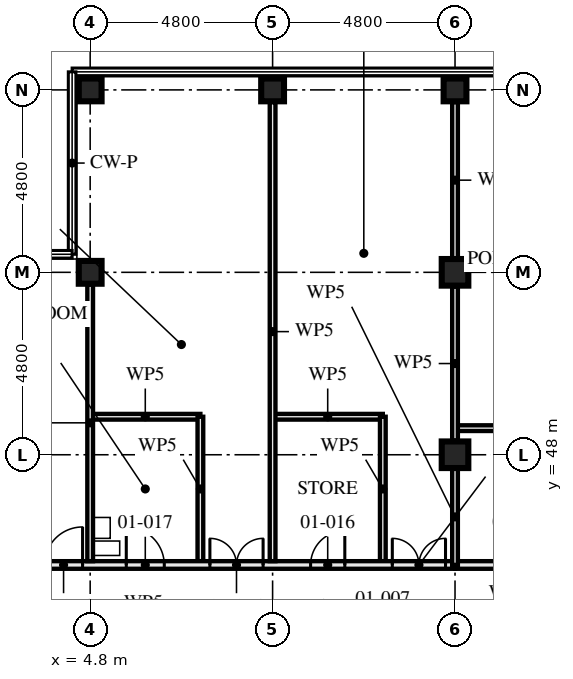
"""IFC4 building model, lengths in metres.
Left out: names, types, materials, properties, quantities, classifications, styles, units other than length and angle.
Written with IfcOpenShell. Run it as: python <this file> out.ifc"""

import sys

from ifc_helpers import new_model, si_unit, direction, frame, frame_2d, origin, origin_2d, place, context, subcontext, project, spatial, rectangle, hollow_rectangle, extrude, element, fill, save


model = new_model("IFC4")
c1 = context("Model", 3, precision=1e-05, world=origin(), true_north=direction((0.0, 1.0)))
c2 = subcontext(c1, "Body", "Model", "MODEL_VIEW")
j1 = project(units=[si_unit("LENGTHUNIT", "METRE"), si_unit("PLANEANGLEUNIT", "RADIAN")], contexts=[c1])
p1 = place(None, origin())
s1 = spatial("IfcSite", under=j1, at=p1, CompositionType="ELEMENT")
p2 = place(p1, origin())
s2 = spatial("IfcBuilding", under=s1, at=p2, CompositionType="ELEMENT")
p3 = place(p2, frame((0.0, 0.0, 4.5)))
s3 = spatial("IfcBuildingStorey", under=s2, at=p3, CompositionType="ELEMENT", Elevation=4.5)
for number, where, z_axis, x_axis in (
    (1, (4.8, 52.8, 0.0), (0.0, 0.0, 1.0), (0.0, 1.0, 0.0)),
    (2, (4.8, 57.6, 0.0), (0.0, 0.0, 1.0), (0.0, 1.0, 0.0)),
    (3, (9.6, 57.6, 0.0), (0.0, 0.0, 1.0), (0.0, 1.0, 0.0)),
):
    element("IfcColumn", number, at=place(p3, frame(where, z_axis=z_axis, x_axis=x_axis)), inside=s3, PredefinedType="COLUMN", context=c2, shape_type="SweptSolid", body=[
        extrude(hollow_rectangle(XDim=0.6, YDim=0.6, WallThickness=0.08, at=origin_2d()), origin(), (0.0, 0.0, 1.0), 4.5),
    ])
for number, where, z_axis, x_axis in (
    (4, (14.4, 48.0, 0.0), (0.0, 0.0, 1.0), (1.0, 0.0, 0.0)),
    (5, (14.4, 52.8, 0.0), (0.0, 0.0, 1.0), (1.0, 0.0, 0.0)),
):
    element("IfcColumn", number, at=place(p3, frame(where, z_axis=z_axis, x_axis=x_axis)), inside=s3, PredefinedType="COLUMN", context=c2, shape_type="SweptSolid", body=[
        extrude(hollow_rectangle(XDim=0.7, YDim=0.7, WallThickness=0.06, at=origin_2d()), origin(), (0.0, 0.0, 1.0), 4.5),
    ])
p4 = place(p3, frame((14.4, 57.6, 0.0), z_axis=(0.0, 0.0, 1.0), x_axis=(0.0, 1.0, 0.0)))
e6 = element("IfcColumn", 6, at=p4, inside=s3, PredefinedType="COLUMN", context=c2, shape_type="SweptSolid", body=[
    extrude(hollow_rectangle(XDim=0.6, YDim=0.6, WallThickness=0.08, at=origin_2d()), origin(), (0.0, 0.0, 1.0), 4.5),
])
p5 = place(p3, frame((12.5, 49.0, 0.0), z_axis=(0.0, 0.0, 1.0), x_axis=(0.0, -1.0, 0.0)))
e7 = element("IfcWall", 7, at=p5, inside=s3, PredefinedType="PARTITIONING", context=c2, shape_type="SweptSolid", body=[
    extrude(rectangle(XDim=3.8, YDim=0.15, at=frame_2d((1.9, 0.0))), origin(), (0.0, 0.0, 1.0), 3.55),
])
p6 = place(p3, frame((12.5, 49.0, 0.0), z_axis=(0.0, 0.0, 1.0), x_axis=(-1.0, 0.0, 0.0)))
e8 = element("IfcWall", 8, at=p6, inside=s3, PredefinedType="PARTITIONING", context=c2, shape_type="SweptSolid", body=[
    extrude(rectangle(XDim=2.9, YDim=0.15, at=frame_2d((1.45, 0.0))), origin(), (0.0, 0.0, 1.0), 4.33),
])
p7 = place(p3, frame((7.7, 49.0, 0.0), z_axis=(0.0, 0.0, 1.0), x_axis=(0.0, -1.0, 0.0)))
e9 = element("IfcWall", 9, at=p7, inside=s3, PredefinedType="PARTITIONING", context=c2, shape_type="SweptSolid", body=[
    extrude(rectangle(XDim=3.8, YDim=0.15, at=frame_2d((1.9, 0.0))), origin(), (0.0, 0.0, 1.0), 3.55),
])
p8 = place(p3, frame((7.7, 49.0, 0.0), z_axis=(0.0, 0.0, 1.0), x_axis=(-1.0, 0.0, 0.0)))
e10 = element("IfcWall", 10, at=p8, inside=s3, PredefinedType="PARTITIONING", context=c2, shape_type="SweptSolid", body=[
    extrude(rectangle(XDim=2.9, YDim=0.15, at=frame_2d((1.45, 0.0))), origin(), (0.0, 0.0, 1.0), 4.33),
])
p9 = place(p3, frame((9.6, 57.28, 0.0), z_axis=(0.0, 0.0, 1.0), x_axis=(0.0, -1.0, 0.0)))
e11 = element("IfcWall", 11, at=p9, inside=s3, PredefinedType="PARTITIONING", context=c2, shape_type="SweptSolid", body=[
    extrude(rectangle(XDim=12.08, YDim=0.15, at=frame_2d((6.04, 0.0))), origin(), (0.0, 0.0, 1.0), 3.55),
])
p10 = place(p3, frame((4.8, 52.48, 0.0), z_axis=(0.0, 0.0, 1.0), x_axis=(0.0, -1.0, 0.0)))
e12 = element("IfcWall", 12, at=p10, inside=s3, PredefinedType="PARTITIONING", context=c2, shape_type="SweptSolid", body=[
    extrude(rectangle(XDim=7.28, YDim=0.15, at=frame_2d((3.64, 0.0))), origin(), (0.0, 0.0, 1.0), 3.55),
])
p11 = place(p3, frame((14.4, 45.1, 0.0), z_axis=(0.0, 0.0, 1.0), x_axis=(-1.0, 0.0, 0.0)))
e13 = element("IfcWall", 13, at=p11, inside=s3, PredefinedType="PARTITIONING", context=c2, shape_type="SweptSolid", body=[
    extrude(rectangle(XDim=14.855, YDim=0.2, at=frame_2d((7.427, 0.0))), origin(), (0.0, 0.0, 1.0), 3.32),
])
p12 = place(p11, frame((0.25, 0.0, 0.0)))
e14 = element("IfcOpeningElement", 14, at=p12, cuts=e13, PredefinedType="OPENING", context=c2, shape_type="SweptSolid", body=[
    extrude(rectangle(XDim=1.4, YDim=2.4, at=frame_2d((0.7, 1.2))), frame((0.0, 0.111, 0.0), z_axis=(0.0, -1.0, 0.0), x_axis=(1.0, 0.0, 0.0)), (0.0, 0.0, 1.0), 0.221),
])
p13 = place(p11, frame((5.05, 0.0, 0.0)))
e15 = element("IfcOpeningElement", 15, at=p13, cuts=e13, PredefinedType="OPENING", context=c2, shape_type="SweptSolid", body=[
    extrude(rectangle(XDim=1.4, YDim=2.4, at=frame_2d((0.7, 1.2))), frame((0.0, 0.111, 0.0), z_axis=(0.0, -1.0, 0.0), x_axis=(1.0, 0.0, 0.0)), (0.0, 0.0, 1.0), 0.221),
])
p14 = place(p11, frame((9.8, 0.0, 0.0)))
e16 = element("IfcOpeningElement", 16, at=p14, cuts=e13, PredefinedType="OPENING", context=c2, shape_type="SweptSolid", body=[
    extrude(rectangle(XDim=1.0, YDim=2.4, at=frame_2d((0.5, 1.2))), frame((0.0, 0.111, 0.0), z_axis=(0.0, -1.0, 0.0), x_axis=(1.0, 0.0, 0.0)), (0.0, 0.0, 1.0), 0.221),
])
p15 = place(p11, frame((2.9, 0.0, 0.0)))
e17 = element("IfcOpeningElement", 17, at=p15, cuts=e13, PredefinedType="OPENING", context=c2, shape_type="SweptSolid", body=[
    extrude(rectangle(XDim=0.9, YDim=2.1, at=frame_2d((0.45, 1.05))), frame((0.0, 0.111, 0.0), z_axis=(0.0, -1.0, 0.0), x_axis=(1.0, 0.0, 0.0)), (0.0, 0.0, 1.0), 0.221),
])
p16 = place(p11, frame((7.65, 0.0, 0.0)))
e18 = element("IfcOpeningElement", 18, at=p16, cuts=e13, PredefinedType="OPENING", context=c2, shape_type="SweptSolid", body=[
    extrude(rectangle(XDim=1.0, YDim=2.1, at=frame_2d((0.5, 1.05))), frame((0.0, 0.111, 0.0), z_axis=(0.0, -1.0, 0.0), x_axis=(1.0, 0.0, 0.0)), (0.0, 0.0, 1.0), 0.221),
])
p17 = place(p11, frame((12.25, 0.0, 0.0)))
e19 = element("IfcOpeningElement", 19, at=p17, cuts=e13, PredefinedType="OPENING", context=c2, shape_type="SweptSolid", body=[
    extrude(rectangle(XDim=0.9, YDim=2.1, at=frame_2d((0.45, 1.05))), frame((0.0, 0.111, 0.0), z_axis=(0.0, -1.0, 0.0), x_axis=(1.0, 0.0, 0.0)), (0.0, 0.0, 1.0), 0.221),
])
p18 = place(p3, frame((17.8, 48.7, 0.0), z_axis=(0.0, 0.0, 1.0), x_axis=(-1.0, 0.0, 0.0)))
e20 = element("IfcWall", 20, at=p18, inside=s3, PredefinedType="PARTITIONING", context=c2, shape_type="SweptSolid", body=[
    extrude(rectangle(XDim=3.4, YDim=0.15, at=frame_2d((1.7, 0.0))), origin(), (0.0, 0.0, 1.0), 4.33),
])
p19 = place(p3, frame((28.8, 45.1, 0.0), z_axis=(0.0, 0.0, 1.0), x_axis=(-1.0, 0.0, 0.0)))
e21 = element("IfcWall", 21, at=p19, inside=s3, PredefinedType="PARTITIONING", context=c2, shape_type="SweptSolid", body=[
    extrude(rectangle(XDim=14.4, YDim=0.2, at=frame_2d((7.2, 0.0))), origin(), (0.0, 0.0, 1.0), 4.33),
])
p20 = place(p19, frame((0.25, 0.0, 0.0)))
e22 = element("IfcOpeningElement", 22, at=p20, cuts=e21, PredefinedType="OPENING", context=c2, shape_type="SweptSolid", body=[
    extrude(rectangle(XDim=1.4, YDim=2.4, at=frame_2d((0.7, 1.2))), frame((0.0, 0.111, 0.0), z_axis=(0.0, -1.0, 0.0), x_axis=(1.0, 0.0, 0.0)), (0.0, 0.0, 1.0), 0.221),
])
p21 = place(p19, frame((5.0, 0.0, 0.0)))
e23 = element("IfcOpeningElement", 23, at=p21, cuts=e21, PredefinedType="OPENING", context=c2, shape_type="SweptSolid", body=[
    extrude(rectangle(XDim=1.0, YDim=2.4, at=frame_2d((0.5, 1.2))), frame((0.0, 0.111, 0.0), z_axis=(0.0, -1.0, 0.0), x_axis=(1.0, 0.0, 0.0)), (0.0, 0.0, 1.0), 0.221),
])
p22 = place(p19, frame((9.8, 0.0, 0.0)))
e24 = element("IfcOpeningElement", 24, at=p22, cuts=e21, PredefinedType="OPENING", context=c2, shape_type="SweptSolid", body=[
    extrude(rectangle(XDim=1.0, YDim=2.4, at=frame_2d((0.5, 1.2))), frame((0.0, 0.111, 0.0), z_axis=(0.0, -1.0, 0.0), x_axis=(1.0, 0.0, 0.0)), (0.0, 0.0, 1.0), 0.221),
])
p23 = place(p19, frame((2.9, 0.0, 0.0)))
e25 = element("IfcOpeningElement", 25, at=p23, cuts=e21, PredefinedType="OPENING", context=c2, shape_type="SweptSolid", body=[
    extrude(rectangle(XDim=0.9, YDim=2.1, at=frame_2d((0.45, 1.05))), frame((0.0, 0.111, 0.0), z_axis=(0.0, -1.0, 0.0), x_axis=(1.0, 0.0, 0.0)), (0.0, 0.0, 1.0), 0.221),
])
p24 = place(p19, frame((7.4, 0.0, 0.0)))
e26 = element("IfcOpeningElement", 26, at=p24, cuts=e21, PredefinedType="OPENING", context=c2, shape_type="SweptSolid", body=[
    extrude(rectangle(XDim=1.0, YDim=2.1, at=frame_2d((0.5, 1.05))), frame((0.0, 0.111, 0.0), z_axis=(0.0, -1.0, 0.0), x_axis=(1.0, 0.0, 0.0)), (0.0, 0.0, 1.0), 0.221),
])
p25 = place(p19, frame((12.25, 0.0, 0.0)))
e27 = element("IfcOpeningElement", 27, at=p25, cuts=e21, PredefinedType="OPENING", context=c2, shape_type="SweptSolid", body=[
    extrude(rectangle(XDim=0.9, YDim=2.1, at=frame_2d((0.45, 1.05))), frame((0.0, 0.111, 0.0), z_axis=(0.0, -1.0, 0.0), x_axis=(1.0, 0.0, 0.0)), (0.0, 0.0, 1.0), 0.221),
])
p26 = place(p3, frame((14.4, 45.1, 0.0), z_axis=(0.0, 0.0, 1.0), x_axis=(0.0, 1.0, 0.0)))
e28 = element("IfcWall", 28, at=p26, inside=s3, PredefinedType="PARTITIONING", context=c2, shape_type="SweptSolid", body=[
    extrude(rectangle(XDim=2.53, YDim=0.15, at=frame_2d((1.265, 0.0))), origin(), (0.0, 0.0, 1.0), 3.32),
])
p27 = place(p3, frame((14.4, 48.37, 0.0), z_axis=(0.0, 0.0, 1.0), x_axis=(0.0, 1.0, 0.0)))
e29 = element("IfcWall", 29, at=p27, inside=s3, PredefinedType="PARTITIONING", context=c2, shape_type="SweptSolid", body=[
    extrude(rectangle(XDim=4.06, YDim=0.15, at=frame_2d((2.03, 0.0))), origin(), (0.0, 0.0, 1.0), 3.32),
])
p28 = place(p3, frame((14.4, 53.17, 0.0), z_axis=(0.0, 0.0, 1.0), x_axis=(0.0, 1.0, 0.0)))
e30 = element("IfcWall", 30, at=p28, inside=s3, PredefinedType="PARTITIONING", context=c2, shape_type="SweptSolid", body=[
    extrude(rectangle(XDim=4.11, YDim=0.15, at=frame_2d((2.055, 0.0))), origin(), (0.0, 0.0, 1.0), 3.32),
])
p29 = place(p12, frame((1.4, 0.0, 0.0), z_axis=(0.0, 0.0, 1.0), x_axis=(-1.0, 0.0, 0.0)))
e31 = element("IfcDoor", 31, at=p29, inside=s3, OperationType="DOUBLE_DOOR_SINGLE_SWING", PredefinedType="DOOR", context=c2, shape_type="SweptSolid", body=[
    extrude(rectangle(XDim=1.4, YDim=2.4, at=frame_2d((0.7, 1.2))), frame((0.0, 0.027, 0.0), z_axis=(0.0, -1.0, 0.0), x_axis=(1.0, 0.0, 0.0)), (0.0, 0.0, 1.0), 0.054),
])
fill(e14, e31)
p30 = place(p13, frame((1.4, 0.0, 0.0), z_axis=(0.0, 0.0, 1.0), x_axis=(-1.0, 0.0, 0.0)))
e32 = element("IfcDoor", 32, at=p30, inside=s3, OperationType="DOUBLE_DOOR_SINGLE_SWING", PredefinedType="DOOR", context=c2, shape_type="SweptSolid", body=[
    extrude(rectangle(XDim=1.4, YDim=2.4, at=frame_2d((0.7, 1.2))), frame((0.0, 0.027, 0.0), z_axis=(0.0, -1.0, 0.0), x_axis=(1.0, 0.0, 0.0)), (0.0, 0.0, 1.0), 0.054),
])
fill(e15, e32)
p31 = place(p14, frame((1.0, 0.0, 0.0), z_axis=(0.0, 0.0, 1.0), x_axis=(-1.0, 0.0, 0.0)))
e33 = element("IfcDoor", 33, at=p31, inside=s3, OperationType="SINGLE_SWING_LEFT", PredefinedType="DOOR", context=c2, shape_type="SweptSolid", body=[
    extrude(rectangle(XDim=1.0, YDim=2.4, at=frame_2d((0.5, 1.2))), frame((0.0, 0.027, 0.0), z_axis=(0.0, -1.0, 0.0), x_axis=(1.0, 0.0, 0.0)), (0.0, 0.0, 1.0), 0.054),
])
fill(e16, e33)
p32 = place(p15, frame((0.9, 0.0, 0.0), z_axis=(0.0, 0.0, 1.0), x_axis=(-1.0, 0.0, 0.0)))
e34 = element("IfcDoor", 34, at=p32, inside=s3, OperationType="SINGLE_SWING_LEFT", PredefinedType="DOOR", context=c2, shape_type="SweptSolid", body=[
    extrude(rectangle(XDim=0.9, YDim=2.1, at=frame_2d((0.45, 1.05))), frame((0.0, 0.027, 0.0), z_axis=(0.0, -1.0, 0.0), x_axis=(1.0, 0.0, 0.0)), (0.0, 0.0, 1.0), 0.054),
])
fill(e17, e34)
p33 = place(p16, frame((1.0, 0.0, 0.0), z_axis=(0.0, 0.0, 1.0), x_axis=(-1.0, 0.0, 0.0)))
e35 = element("IfcDoor", 35, at=p33, inside=s3, OperationType="SINGLE_SWING_RIGHT", PredefinedType="DOOR", context=c2, shape_type="SweptSolid", body=[
    extrude(rectangle(XDim=1.0, YDim=2.1, at=frame_2d((0.5, 1.05))), frame((0.0, 0.027, 0.0), z_axis=(0.0, -1.0, 0.0), x_axis=(1.0, 0.0, 0.0)), (0.0, 0.0, 1.0), 0.054),
])
fill(e18, e35)
save(model, sys.argv[1])
